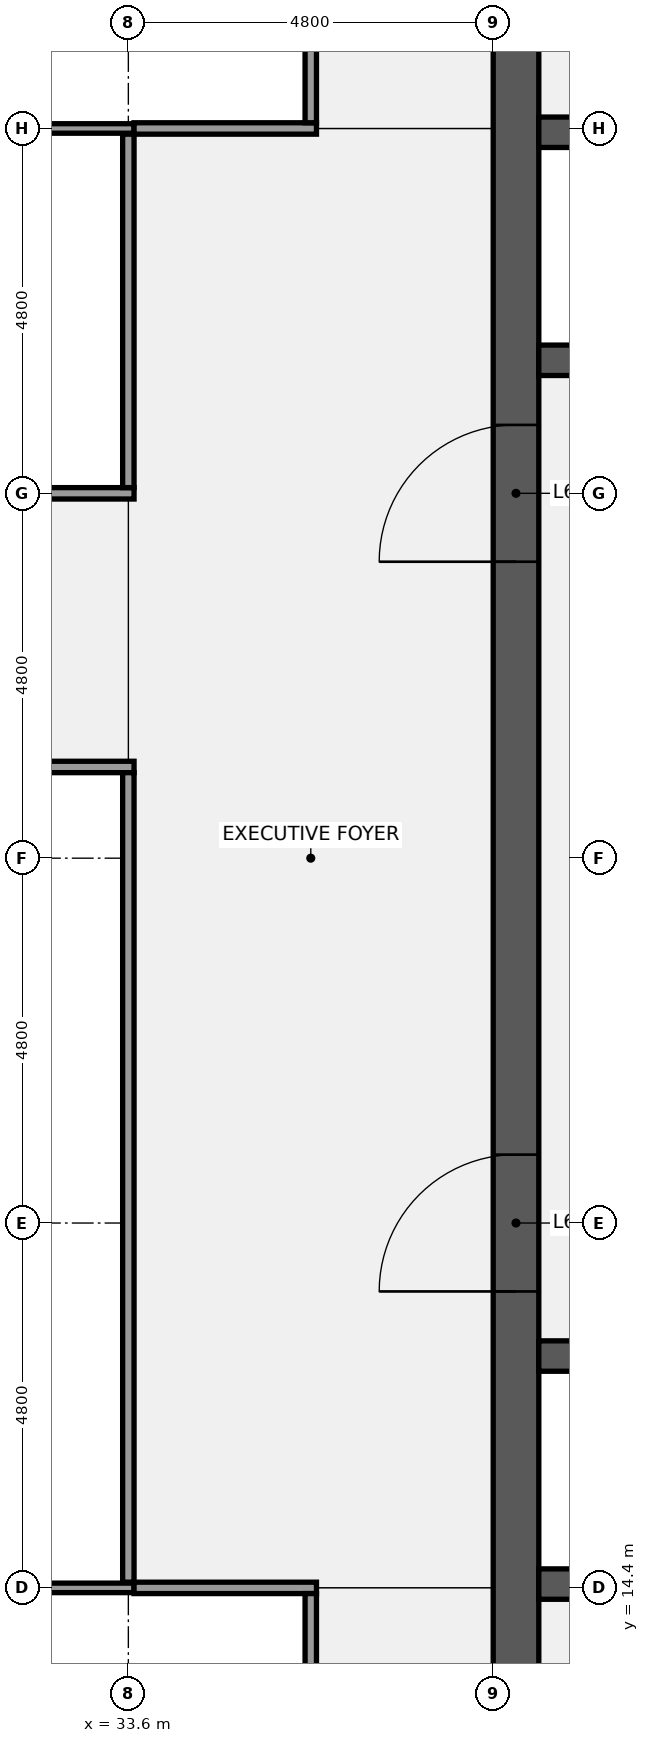
"""IFC4 building model, lengths in metres.
Left out: names, types, materials, properties, quantities, classifications, styles, units other than length and angle.
Written with IfcOpenShell. Run it as: python <this file> out.ifc"""

import sys

from ifc_helpers import new_model, si_unit, direction, frame, frame_2d, origin, place, context, subcontext, project, spatial, rectangle, extrude, element, fill, save


model = new_model("IFC4")
c1 = context("Model", 3, precision=1e-05, world=origin(), true_north=direction((0.0, 1.0)))
c2 = subcontext(c1, "Body", "Model", "MODEL_VIEW")
j1 = project(units=[si_unit("LENGTHUNIT", "METRE"), si_unit("PLANEANGLEUNIT", "RADIAN")], contexts=[c1])
p1 = place(None, origin())
s1 = spatial("IfcSite", under=j1, at=p1, CompositionType="ELEMENT")
p2 = place(p1, origin())
s2 = spatial("IfcBuilding", under=s1, at=p2, CompositionType="ELEMENT")
p3 = place(p2, frame((0.0, 0.0, 286.3)))
s3 = spatial("IfcBuildingStorey", under=s2, at=p3, CompositionType="ELEMENT", Elevation=286.3)
p4 = place(p3, frame((38.7, 9.6, 0.0), z_axis=(0.0, 0.0, 1.0), x_axis=(0.0, 1.0, 0.0)))
e1 = element("IfcWall", 1, at=p4, inside=s3, PredefinedType="SHEAR", context=c2, shape_type="SweptSolid", body=[
    extrude(rectangle(XDim=28.8, YDim=0.6, at=frame_2d((14.4, 0.0))), origin(), (0.0, 0.0, 1.0), 3.84),
])
p5 = place(p4, frame((8.7, 0.0, 0.0)))
e2 = element("IfcOpeningElement", 2, at=p5, cuts=e1, PredefinedType="OPENING", context=c2, shape_type="SweptSolid", body=[
    extrude(rectangle(XDim=1.8, YDim=2.1, at=frame_2d((0.9, 1.05))), frame((0.0, 0.31, 0.0), z_axis=(0.0, -1.0, 0.0), x_axis=(1.0, 0.0, 0.0)), (0.0, 0.0, 1.0), 0.62),
])
p6 = place(p4, frame((18.3, 0.0, 0.0)))
e3 = element("IfcOpeningElement", 3, at=p6, cuts=e1, PredefinedType="OPENING", context=c2, shape_type="SweptSolid", body=[
    extrude(rectangle(XDim=1.8, YDim=2.1, at=frame_2d((0.9, 1.05))), frame((0.0, 0.31, 0.0), z_axis=(0.0, -1.0, 0.0), x_axis=(1.0, 0.0, 0.0)), (0.0, 0.0, 1.0), 0.62),
])
p7 = place(p3, frame((39.0, 14.45, 0.0), z_axis=(0.0, 0.0, 1.0), x_axis=(1.0, 0.0, 0.0)))
e4 = element("IfcWall", 4, at=p7, inside=s3, PredefinedType="SHEAR", context=c2, shape_type="SweptSolid", body=[
    extrude(rectangle(XDim=18.0, YDim=0.4, at=frame_2d((9.0, 0.0))), origin(), (0.0, 0.0, 1.0), 3.84),
])
p8 = place(p3, frame((39.0, 17.45, 0.0), z_axis=(0.0, 0.0, 1.0), x_axis=(1.0, 0.0, 0.0)))
e5 = element("IfcWall", 5, at=p8, inside=s3, PredefinedType="SHEAR", context=c2, shape_type="SweptSolid", body=[
    extrude(rectangle(XDim=18.0, YDim=0.4, at=frame_2d((9.0, 0.0))), origin(), (0.0, 0.0, 1.0), 3.84),
])
p9 = place(p8, frame((15.137, 0.0, 0.0)))
e6 = element("IfcOpeningElement", 6, at=p9, cuts=e5, PredefinedType="OPENING", context=c2, shape_type="SweptSolid", body=[
    extrude(rectangle(XDim=1.0, YDim=2.1, at=frame_2d((0.5, 1.05))), frame((0.0, 0.21, 0.0), z_axis=(0.0, -1.0, 0.0), x_axis=(1.0, 0.0, 0.0)), (0.0, 0.0, 1.0), 0.42),
])
p10 = place(p8, frame((11.5, 0.0, 0.0)))
e7 = element("IfcOpeningElement", 7, at=p10, cuts=e5, PredefinedType="OPENING", context=c2, shape_type="SweptSolid", body=[
    extrude(rectangle(XDim=1.0, YDim=2.1, at=frame_2d((0.5, 1.05))), frame((0.0, 0.21, 0.0), z_axis=(0.0, -1.0, 0.0), x_axis=(1.0, 0.0, 0.0)), (0.0, 0.0, 1.0), 0.42),
])
p11 = place(p8, frame((7.3, 0.0, 0.0)))
e8 = element("IfcOpeningElement", 8, at=p11, cuts=e5, PredefinedType="OPENING", context=c2, shape_type="SweptSolid", body=[
    extrude(rectangle(XDim=1.0, YDim=2.1, at=frame_2d((0.5, 1.05))), frame((0.0, 0.21, 0.0), z_axis=(0.0, -1.0, 0.0), x_axis=(1.0, 0.0, 0.0)), (0.0, 0.0, 1.0), 0.42),
])
p12 = place(p8, frame((1.863, 0.0, 0.0)))
e9 = element("IfcOpeningElement", 9, at=p12, cuts=e5, PredefinedType="OPENING", context=c2, shape_type="SweptSolid", body=[
    extrude(rectangle(XDim=1.0, YDim=2.1, at=frame_2d((0.5, 1.05))), frame((0.0, 0.21, 0.0), z_axis=(0.0, -1.0, 0.0), x_axis=(1.0, 0.0, 0.0)), (0.0, 0.0, 1.0), 0.42),
])
p13 = place(p3, frame((39.0, 30.55, 0.0), z_axis=(0.0, 0.0, 1.0), x_axis=(1.0, 0.0, 0.0)))
e10 = element("IfcWall", 10, at=p13, inside=s3, PredefinedType="SHEAR", context=c2, shape_type="SweptSolid", body=[
    extrude(rectangle(XDim=18.0, YDim=0.4, at=frame_2d((9.0, 0.0))), origin(), (0.0, 0.0, 1.0), 3.84),
])
p14 = place(p13, frame((15.2, 0.0, 0.0)))
e11 = element("IfcOpeningElement", 11, at=p14, cuts=e10, PredefinedType="OPENING", context=c2, shape_type="SweptSolid", body=[
    extrude(rectangle(XDim=1.2, YDim=2.1, at=frame_2d((0.6, 1.05))), frame((0.0, 0.21, 0.0), z_axis=(0.0, -1.0, 0.0), x_axis=(1.0, 0.0, 0.0)), (0.0, 0.0, 1.0), 0.42),
])
p15 = place(p13, frame((12.6, 0.0, 0.0)))
e12 = element("IfcOpeningElement", 12, at=p15, cuts=e10, PredefinedType="OPENING", context=c2, shape_type="SweptSolid", body=[
    extrude(rectangle(XDim=1.2, YDim=2.1, at=frame_2d((0.6, 1.05))), frame((0.0, 0.21, 0.0), z_axis=(0.0, -1.0, 0.0), x_axis=(1.0, 0.0, 0.0)), (0.0, 0.0, 1.0), 0.42),
])
p16 = place(p13, frame((10.0, 0.0, 0.0)))
e13 = element("IfcOpeningElement", 13, at=p16, cuts=e10, PredefinedType="OPENING", context=c2, shape_type="SweptSolid", body=[
    extrude(rectangle(XDim=1.2, YDim=2.1, at=frame_2d((0.6, 1.05))), frame((0.0, 0.21, 0.0), z_axis=(0.0, -1.0, 0.0), x_axis=(1.0, 0.0, 0.0)), (0.0, 0.0, 1.0), 0.42),
])
p17 = place(p13, frame((6.8, 0.0, 0.0)))
e14 = element("IfcOpeningElement", 14, at=p17, cuts=e10, PredefinedType="OPENING", context=c2, shape_type="SweptSolid", body=[
    extrude(rectangle(XDim=1.2, YDim=2.1, at=frame_2d((0.6, 1.05))), frame((0.0, 0.21, 0.0), z_axis=(0.0, -1.0, 0.0), x_axis=(1.0, 0.0, 0.0)), (0.0, 0.0, 1.0), 0.42),
])
p18 = place(p13, frame((4.2, 0.0, 0.0)))
e15 = element("IfcOpeningElement", 15, at=p18, cuts=e10, PredefinedType="OPENING", context=c2, shape_type="SweptSolid", body=[
    extrude(rectangle(XDim=1.2, YDim=2.1, at=frame_2d((0.6, 1.05))), frame((0.0, 0.21, 0.0), z_axis=(0.0, -1.0, 0.0), x_axis=(1.0, 0.0, 0.0)), (0.0, 0.0, 1.0), 0.42),
])
p19 = place(p13, frame((1.6, 0.0, 0.0)))
e16 = element("IfcOpeningElement", 16, at=p19, cuts=e10, PredefinedType="OPENING", context=c2, shape_type="SweptSolid", body=[
    extrude(rectangle(XDim=1.2, YDim=2.1, at=frame_2d((0.6, 1.05))), frame((0.0, 0.21, 0.0), z_axis=(0.0, -1.0, 0.0), x_axis=(1.0, 0.0, 0.0)), (0.0, 0.0, 1.0), 0.42),
])
p20 = place(p3, frame((39.0, 33.55, 0.0), z_axis=(0.0, 0.0, 1.0), x_axis=(1.0, 0.0, 0.0)))
e17 = element("IfcWall", 17, at=p20, inside=s3, PredefinedType="SHEAR", context=c2, shape_type="SweptSolid", body=[
    extrude(rectangle(XDim=18.0, YDim=0.4, at=frame_2d((9.0, 0.0))), origin(), (0.0, 0.0, 1.0), 3.84),
])
p21 = place(p3, frame((24.075, 14.4, 0.0), z_axis=(0.0, 0.0, 1.0), x_axis=(1.0, 0.0, 0.0)))
e18 = element("IfcWall", 18, at=p21, inside=s3, PredefinedType="PARTITIONING", context=c2, shape_type="SweptSolid", body=[
    extrude(rectangle(XDim=9.6, YDim=0.125, at=frame_2d((4.8, 0.0))), origin(), (0.0, 0.0, 1.0), 2.849),
])
p22 = place(p3, frame((33.675, 14.4, 0.0), z_axis=(0.0, 0.0, 1.0), x_axis=(1.0, 0.0, 0.0)))
e19 = element("IfcWall", 19, at=p22, inside=s3, PredefinedType="PARTITIONING", context=c2, shape_type="SweptSolid", body=[
    extrude(rectangle(XDim=2.4, YDim=0.15, at=frame_2d((1.2, 0.0))), origin(), (0.0, 0.0, 1.0), 2.849),
])
p23 = place(p3, frame((23.925, 25.2, 0.0), z_axis=(0.0, 0.0, 1.0), x_axis=(1.0, 0.0, 0.0)))
e20 = element("IfcWall", 20, at=p23, inside=s3, PredefinedType="PARTITIONING", context=c2, shape_type="SweptSolid", body=[
    extrude(rectangle(XDim=9.75, YDim=0.15, at=frame_2d((4.875, 0.0))), origin(), (0.0, 0.0, 1.0), 2.849),
])
p24 = place(p3, frame((23.925, 28.8, 0.0), z_axis=(0.0, 0.0, 1.0), x_axis=(1.0, 0.0, 0.0)))
e21 = element("IfcWall", 21, at=p24, inside=s3, PredefinedType="PARTITIONING", context=c2, shape_type="SweptSolid", body=[
    extrude(rectangle(XDim=9.75, YDim=0.15, at=frame_2d((4.875, 0.0))), origin(), (0.0, 0.0, 1.0), 2.849),
])
p25 = place(p24, frame((4.375, 0.0, 0.0)))
e22 = element("IfcOpeningElement", 22, at=p25, cuts=e21, PredefinedType="OPENING", context=c2, shape_type="SweptSolid", body=[
    extrude(rectangle(XDim=1.0, YDim=2.1, at=frame_2d((0.5, 1.05))), frame((0.0, 0.085, 0.0), z_axis=(0.0, -1.0, 0.0), x_axis=(1.0, 0.0, 0.0)), (0.0, 0.0, 1.0), 0.17),
])
p26 = place(p3, frame((24.075, 33.6, 0.0), z_axis=(0.0, 0.0, 1.0), x_axis=(1.0, 0.0, 0.0)))
e23 = element("IfcWall", 23, at=p26, inside=s3, PredefinedType="PARTITIONING", context=c2, shape_type="SweptSolid", body=[
    extrude(rectangle(XDim=9.6, YDim=0.125, at=frame_2d((4.8, 0.0))), origin(), (0.0, 0.0, 1.0), 2.849),
])
p27 = place(p3, frame((33.675, 33.6, 0.0), z_axis=(0.0, 0.0, 1.0), x_axis=(1.0, 0.0, 0.0)))
e24 = element("IfcWall", 24, at=p27, inside=s3, PredefinedType="PARTITIONING", context=c2, shape_type="SweptSolid", body=[
    extrude(rectangle(XDim=2.4, YDim=0.15, at=frame_2d((1.2, 0.0))), origin(), (0.0, 0.0, 1.0), 2.849),
])
p28 = place(p3, frame((33.6, 14.475, 0.0), z_axis=(0.0, 0.0, 1.0), x_axis=(0.0, 1.0, 0.0)))
e25 = element("IfcWall", 25, at=p28, inside=s3, PredefinedType="PARTITIONING", context=c2, shape_type="SweptSolid", body=[
    extrude(rectangle(XDim=10.65, YDim=0.15, at=frame_2d((5.325, 0.0))), origin(), (0.0, 0.0, 1.0), 2.849),
])
p29 = place(p3, frame((33.6, 28.875, 0.0), z_axis=(0.0, 0.0, 1.0), x_axis=(0.0, 1.0, 0.0)))
e26 = element("IfcWall", 26, at=p29, inside=s3, PredefinedType="PARTITIONING", context=c2, shape_type="SweptSolid", body=[
    extrude(rectangle(XDim=4.65, YDim=0.15, at=frame_2d((2.325, 0.0))), origin(), (0.0, 0.0, 1.0), 2.849),
])
p30 = place(p3, frame((36.0, 9.675, 0.0), z_axis=(0.0, 0.0, 1.0), x_axis=(0.0, 1.0, 0.0)))
e27 = element("IfcWall", 27, at=p30, inside=s3, PredefinedType="PARTITIONING", context=c2, shape_type="SweptSolid", body=[
    extrude(rectangle(XDim=4.65, YDim=0.15, at=frame_2d((2.325, 0.0))), origin(), (0.0, 0.0, 1.0), 2.849),
])
p31 = place(p30, frame((1.825, 0.0, 0.0)))
e28 = element("IfcOpeningElement", 28, at=p31, cuts=e27, PredefinedType="OPENING", context=c2, shape_type="SweptSolid", body=[
    extrude(rectangle(XDim=1.0, YDim=2.1, at=frame_2d((0.5, 1.05))), frame((0.0, 0.085, 0.0), z_axis=(0.0, -1.0, 0.0), x_axis=(1.0, 0.0, 0.0)), (0.0, 0.0, 1.0), 0.17),
])
p32 = place(p3, frame((36.0, 33.675, 0.0), z_axis=(0.0, 0.0, 1.0), x_axis=(0.0, 1.0, 0.0)))
e29 = element("IfcWall", 29, at=p32, inside=s3, PredefinedType="PARTITIONING", context=c2, shape_type="SweptSolid", body=[
    extrude(rectangle(XDim=4.65, YDim=0.15, at=frame_2d((2.325, 0.0))), origin(), (0.0, 0.0, 1.0), 2.849),
])
p33 = place(p5, origin())
e30 = element("IfcDoor", 30, at=p33, inside=s3, OperationType="DOUBLE_DOOR_SINGLE_SWING", PredefinedType="DOOR", context=c2, shape_type="SweptSolid", body=[
    extrude(rectangle(XDim=1.8, YDim=2.1, at=frame_2d((0.9, 1.05))), frame((0.0, 0.025, 0.0), z_axis=(0.0, -1.0, 0.0), x_axis=(1.0, 0.0, 0.0)), (0.0, 0.0, 1.0), 0.05),
])
fill(e2, e30)
p34 = place(p6, origin())
e31 = element("IfcDoor", 31, at=p34, inside=s3, OperationType="DOUBLE_DOOR_SINGLE_SWING", PredefinedType="DOOR", context=c2, shape_type="SweptSolid", body=[
    extrude(rectangle(XDim=1.8, YDim=2.1, at=frame_2d((0.9, 1.05))), frame((0.0, 0.025, 0.0), z_axis=(0.0, -1.0, 0.0), x_axis=(1.0, 0.0, 0.0)), (0.0, 0.0, 1.0), 0.05),
])
fill(e3, e31)
save(model, sys.argv[1])
